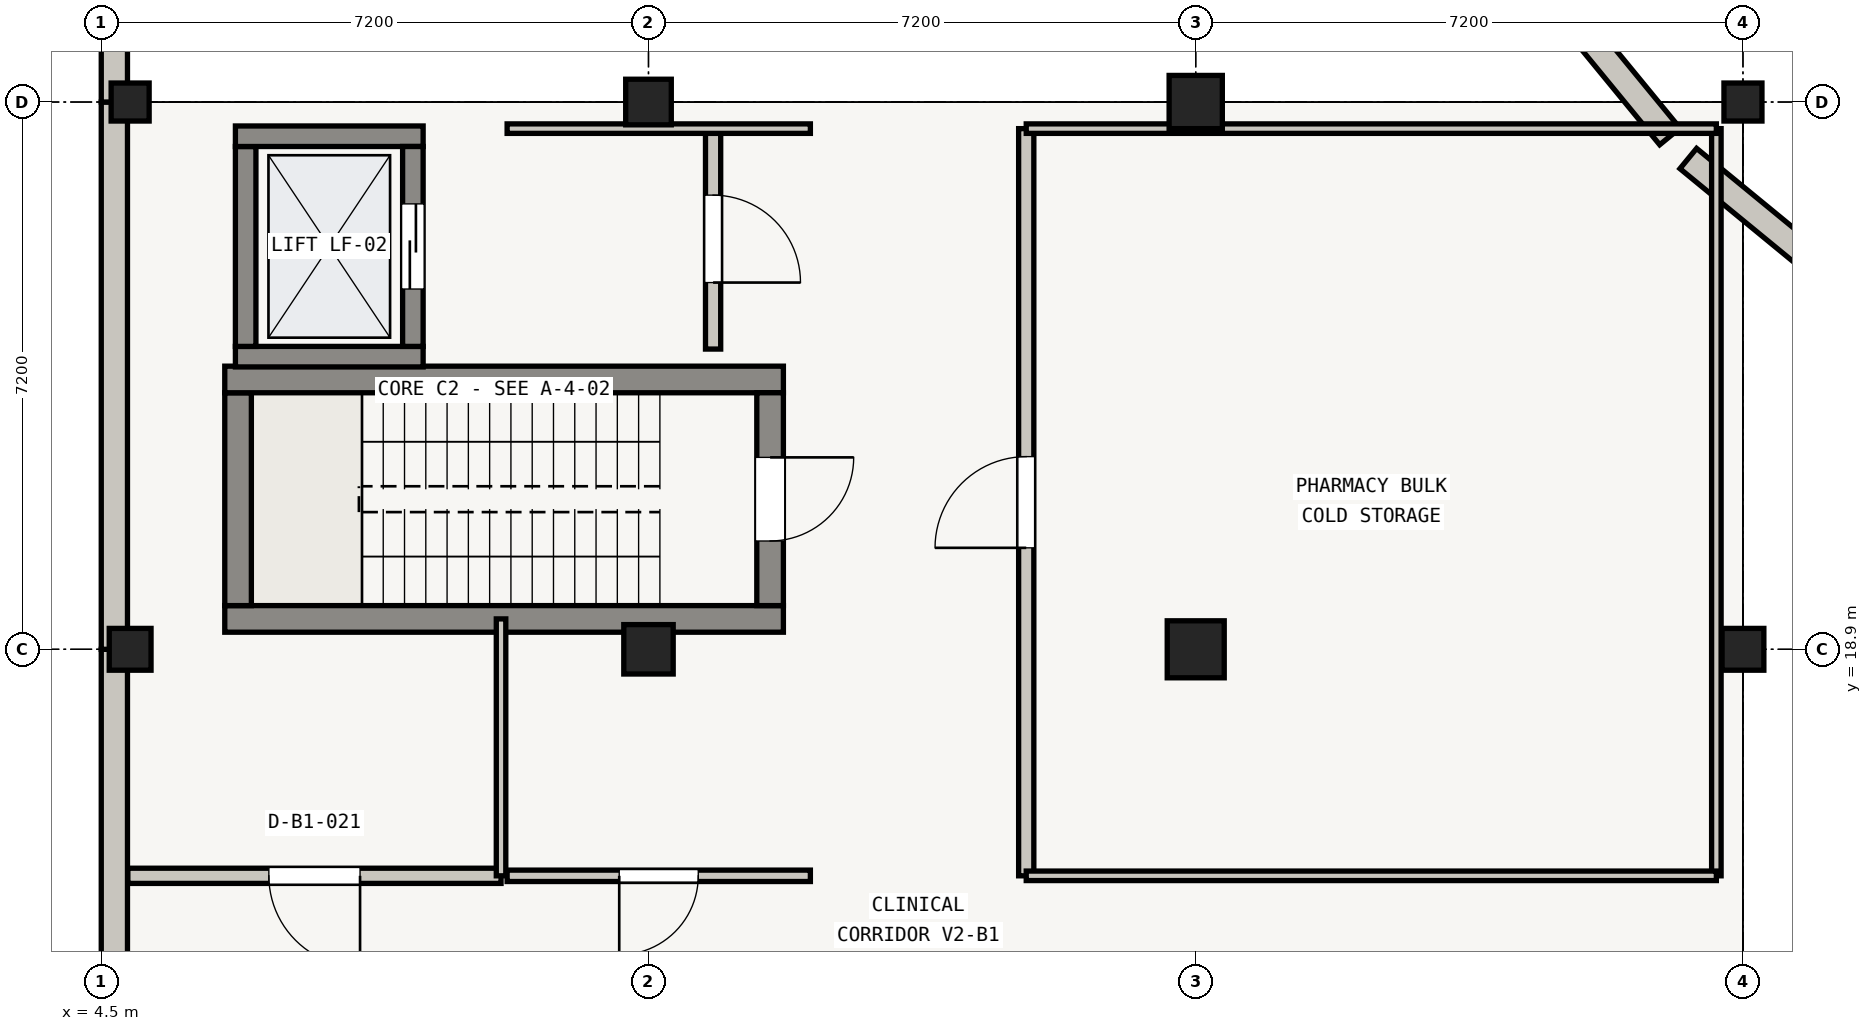
"""IFC4 building model, lengths in metres.
Left out: names, types, materials, properties, quantities, classifications, styles, units other than length and angle.
Written with IfcOpenShell. Run it as: python <this file> out.ifc"""

import sys

from ifc_helpers import new_model, si_unit, direction, frame, frame_2d, origin, origin_2d, place, context, subcontext, project, spatial, rectangle, extrude, element, fill, save


model = new_model("IFC4")
c1 = context("Model", 3, precision=1e-05, world=origin(), true_north=direction((0.0, 1.0)))
c2 = subcontext(c1, "Body", "Model", "MODEL_VIEW")
j1 = project(units=[si_unit("LENGTHUNIT", "METRE"), si_unit("PLANEANGLEUNIT", "RADIAN")], contexts=[c1])
p1 = place(None, origin())
s1 = spatial("IfcSite", under=j1, at=p1, CompositionType="ELEMENT")
p2 = place(p1, origin())
s2 = spatial("IfcBuilding", under=s1, at=p2, CompositionType="ELEMENT")
p3 = place(p2, frame((0.0, 0.0, -4.5)))
s3 = spatial("IfcBuildingStorey", under=s2, at=p3, CompositionType="ELEMENT", Elevation=-4.5)
p4 = place(p3, frame((4.88, 18.9, -0.42), z_axis=(0.0, 0.0, 1.0), x_axis=(1.0, 0.0, 0.0)))
e1 = element("IfcColumn", 1, at=p4, inside=s3, PredefinedType="COLUMN", context=c2, shape_type="SweptSolid", body=[
    extrude(rectangle(XDim=0.55, YDim=0.55, at=origin_2d()), origin(), (0.0, 0.0, 1.0), 4.64),
])
p5 = place(p3, frame((4.88, 26.1, -0.42), z_axis=(0.0, 0.0, 1.0), x_axis=(1.0, 0.0, 0.0)))
e2 = element("IfcColumn", 2, at=p5, inside=s3, PredefinedType="COLUMN", context=c2, shape_type="SweptSolid", body=[
    extrude(rectangle(XDim=0.5, YDim=0.5, at=origin_2d()), origin(), (0.0, 0.0, 1.0), 4.64),
])
p6 = place(p3, frame((11.7, 18.9, -0.42), z_axis=(0.0, 0.0, 1.0), x_axis=(1.0, 0.0, 0.0)))
e3 = element("IfcColumn", 3, at=p6, inside=s3, PredefinedType="COLUMN", context=c2, shape_type="SweptSolid", body=[
    extrude(rectangle(XDim=0.65, YDim=0.65, at=origin_2d()), origin(), (0.0, 0.0, 1.0), 4.64),
])
p7 = place(p3, frame((11.7, 26.1, -0.42), z_axis=(0.0, 0.0, 1.0), x_axis=(1.0, 0.0, 0.0)))
e4 = element("IfcColumn", 4, at=p7, inside=s3, PredefinedType="COLUMN", context=c2, shape_type="SweptSolid", body=[
    extrude(rectangle(XDim=0.6, YDim=0.6, at=origin_2d()), origin(), (0.0, 0.0, 1.0), 4.64),
])
p8 = place(p3, frame((18.9, 18.9, -0.42), z_axis=(0.0, 0.0, 1.0), x_axis=(1.0, 0.0, 0.0)))
e5 = element("IfcColumn", 5, at=p8, inside=s3, PredefinedType="COLUMN", context=c2, shape_type="SweptSolid", body=[
    extrude(rectangle(XDim=0.75, YDim=0.75, at=origin_2d()), origin(), (0.0, 0.0, 1.0), 4.64),
])
p9 = place(p3, frame((18.9, 26.1, -0.42), z_axis=(0.0, 0.0, 1.0), x_axis=(1.0, 0.0, 0.0)))
e6 = element("IfcColumn", 6, at=p9, inside=s3, PredefinedType="COLUMN", context=c2, shape_type="SweptSolid", body=[
    extrude(rectangle(XDim=0.7, YDim=0.7, at=origin_2d()), origin(), (0.0, 0.0, 1.0), 4.64),
])
p10 = place(p3, frame((26.1, 18.9, -0.42), z_axis=(0.0, 0.0, 1.0), x_axis=(1.0, 0.0, 0.0)))
e7 = element("IfcColumn", 7, at=p10, inside=s3, PredefinedType="COLUMN", context=c2, shape_type="SweptSolid", body=[
    extrude(rectangle(XDim=0.55, YDim=0.55, at=origin_2d()), origin(), (0.0, 0.0, 1.0), 4.64),
])
p11 = place(p3, frame((26.1, 26.1, -0.42), z_axis=(0.0, 0.0, 1.0), x_axis=(1.0, 0.0, 0.0)))
e8 = element("IfcColumn", 8, at=p11, inside=s3, PredefinedType="COLUMN", context=c2, shape_type="SweptSolid", body=[
    extrude(rectangle(XDim=0.5, YDim=0.5, at=origin_2d()), origin(), (0.0, 0.0, 1.0), 4.64),
])
p12 = place(p3, frame((22.777, 28.524, -0.42), z_axis=(0.0, 0.0, 1.0), x_axis=(0.634416148035, -0.772991688903, 0.0)))
e9 = element("IfcWall", 9, at=p12, inside=s3, PredefinedType="SOLIDWALL", context=c2, shape_type="SweptSolid", body=[
    extrude(rectangle(XDim=3.721, YDim=0.345, at=frame_2d((1.86, 0.0))), origin(), (0.0, 0.0, 1.0), 4.175),
])
p13 = place(p3, frame((25.381, 25.357, -0.42), z_axis=(0.0, 0.0, 1.0), x_axis=(0.773026739032, -0.634373439499, 0.0)))
e10 = element("IfcWall", 10, at=p13, inside=s3, PredefinedType="SOLIDWALL", context=c2, shape_type="SweptSolid", body=[
    extrude(rectangle(XDim=4.411, YDim=0.345, at=frame_2d((2.206, 0.0))), origin(), (0.0, 0.0, 1.0), 3.975),
])
p14 = place(p3, frame((4.673, 11.7, -0.42), z_axis=(0.0, 0.0, 1.0), x_axis=(0.0, 1.0, 0.0)))
e11 = element("IfcWall", 11, at=p14, inside=s3, PredefinedType="SOLIDWALL", context=c2, shape_type="SweptSolid", body=[
    extrude(rectangle(XDim=7.2, YDim=0.345, at=frame_2d((3.6, 0.0))), origin(), (0.0, 0.0, 1.0), 4.005),
])
p15 = place(p3, frame((4.673, 18.9, -0.42), z_axis=(0.0, 0.0, 1.0), x_axis=(0.0, 1.0, 0.0)))
e12 = element("IfcWall", 12, at=p15, inside=s3, PredefinedType="SOLIDWALL", context=c2, shape_type="SweptSolid", body=[
    extrude(rectangle(XDim=7.2, YDim=0.345, at=frame_2d((3.6, 0.0))), origin(), (0.0, 0.0, 1.0), 4.025),
])
p16 = place(p3, frame((4.673, 26.1, -0.42), z_axis=(0.0, 0.0, 1.0), x_axis=(0.0, 1.0, 0.0)))
e13 = element("IfcWall", 13, at=p16, inside=s3, PredefinedType="SOLIDWALL", context=c2, shape_type="SweptSolid", body=[
    extrude(rectangle(XDim=10.2, YDim=0.345, at=frame_2d((5.1, 0.0))), origin(), (0.0, 0.0, 1.0), 4.045),
])
p17 = place(p3, frame((13.475, 19.3, 0.0), z_axis=(0.0, 0.0, 1.0), x_axis=(-1.0, 0.0, 0.0)))
e14 = element("IfcWall", 14, at=p17, inside=s3, PredefinedType="SHEAR", context=c2, shape_type="SweptSolid", body=[
    extrude(rectangle(XDim=7.35, YDim=0.35, at=frame_2d((3.675, 0.0))), origin(), (0.0, 0.0, 1.0), 4.22),
])
p18 = place(p3, frame((6.3, 19.475, 0.0), z_axis=(0.0, 0.0, 1.0), x_axis=(0.0, 1.0, 0.0)))
e15 = element("IfcWall", 15, at=p18, inside=s3, PredefinedType="SHEAR", context=c2, shape_type="SweptSolid", body=[
    extrude(rectangle(XDim=2.8, YDim=0.35, at=frame_2d((1.4, 0.0))), origin(), (0.0, 0.0, 1.0), 4.22),
])
p19 = place(p3, frame((6.125, 22.45, 0.0), z_axis=(0.0, 0.0, 1.0), x_axis=(1.0, 0.0, 0.0)))
e16 = element("IfcWall", 16, at=p19, inside=s3, PredefinedType="SHEAR", context=c2, shape_type="SweptSolid", body=[
    extrude(rectangle(XDim=7.35, YDim=0.35, at=frame_2d((3.675, 0.0))), origin(), (0.0, 0.0, 1.0), 4.22),
])
p20 = place(p3, frame((13.3, 22.275, 0.0), z_axis=(0.0, 0.0, 1.0), x_axis=(0.0, -1.0, 0.0)))
e17 = element("IfcWall", 17, at=p20, inside=s3, PredefinedType="SHEAR", context=c2, shape_type="SweptSolid", body=[
    extrude(rectangle(XDim=2.8, YDim=0.35, at=frame_2d((1.4, 0.0))), origin(), (0.0, 0.0, 1.0), 4.22),
])
p21 = place(p20, frame((0.85, 0.0, 0.0)))
e18 = element("IfcOpeningElement", 18, at=p21, cuts=e17, PredefinedType="OPENING", context=c2, shape_type="SweptSolid", body=[
    extrude(rectangle(XDim=1.1, YDim=2.05, at=frame_2d((0.55, 1.025))), frame((0.0, 0.175, 0.0), z_axis=(0.0, -1.0, 0.0), x_axis=(1.0, 0.0, 0.0)), (0.0, 0.0, 1.0), 0.35),
])
p22 = place(p3, frame((8.735, 22.75, 0.0), z_axis=(0.0, 0.0, 1.0), x_axis=(-1.0, 0.0, 0.0)))
e19 = element("IfcWall", 19, at=p22, inside=s3, PredefinedType="SHEAR", context=c2, shape_type="SweptSolid", body=[
    extrude(rectangle(XDim=2.47, YDim=0.27, at=frame_2d((1.235, 0.0))), origin(), (0.0, 0.0, 1.0), 4.22),
])
p23 = place(p3, frame((6.4, 22.885, 0.0), z_axis=(0.0, 0.0, 1.0), x_axis=(0.0, 1.0, 0.0)))
e20 = element("IfcWall", 20, at=p23, inside=s3, PredefinedType="SHEAR", context=c2, shape_type="SweptSolid", body=[
    extrude(rectangle(XDim=2.63, YDim=0.27, at=frame_2d((1.315, 0.0))), origin(), (0.0, 0.0, 1.0), 4.22),
])
p24 = place(p3, frame((6.265, 25.65, 0.0), z_axis=(0.0, 0.0, 1.0), x_axis=(1.0, 0.0, 0.0)))
e21 = element("IfcWall", 21, at=p24, inside=s3, PredefinedType="SHEAR", context=c2, shape_type="SweptSolid", body=[
    extrude(rectangle(XDim=2.47, YDim=0.27, at=frame_2d((1.235, 0.0))), origin(), (0.0, 0.0, 1.0), 4.22),
])
p25 = place(p3, frame((8.6, 25.515, 0.0), z_axis=(0.0, 0.0, 1.0), x_axis=(0.0, -1.0, 0.0)))
e22 = element("IfcWall", 22, at=p25, inside=s3, PredefinedType="SHEAR", context=c2, shape_type="SweptSolid", body=[
    extrude(rectangle(XDim=2.63, YDim=0.27, at=frame_2d((1.315, 0.0))), origin(), (0.0, 0.0, 1.0), 4.22),
])
p26 = place(p25, frame((0.755, 0.0, 0.0)))
e23 = element("IfcOpeningElement", 23, at=p26, cuts=e22, PredefinedType="OPENING", context=c2, shape_type="SweptSolid", body=[
    extrude(rectangle(XDim=1.12, YDim=2.1, at=frame_2d((0.56, 1.05))), frame((0.0, 0.135, 0.0), z_axis=(0.0, -1.0, 0.0), x_axis=(1.0, 0.0, 0.0)), (0.0, 0.0, 1.0), 0.27),
])
p27 = place(p3, frame((12.55, 25.75, 0.0), z_axis=(0.0, 0.0, 1.0), x_axis=(0.0, -1.0, 0.0)))
e24 = element("IfcWall", 24, at=p27, inside=s3, PredefinedType="SOLIDWALL", context=c2, shape_type="SweptSolid", body=[
    extrude(rectangle(XDim=2.9, YDim=0.2, at=frame_2d((1.45, 0.0))), origin(), (0.0, 0.0, 1.0), 3.24),
])
p28 = place(p27, frame((0.875, 0.0, 0.0)))
e25 = element("IfcOpeningElement", 25, at=p28, cuts=e24, PredefinedType="OPENING", context=c2, shape_type="SweptSolid", body=[
    extrude(rectangle(XDim=1.15, YDim=2.05, at=frame_2d((0.575, 1.025))), frame((0.0, 0.1, 0.0), z_axis=(0.0, -1.0, 0.0), x_axis=(1.0, 0.0, 0.0)), (0.0, 0.0, 1.0), 0.2),
])
p29 = place(p3, frame((16.67, 15.92, 0.0), z_axis=(0.0, 0.0, 1.0), x_axis=(0.0, 1.0, 0.0)))
e26 = element("IfcWall", 26, at=p29, inside=s3, PredefinedType="SOLIDWALL", context=c2, shape_type="SweptSolid", body=[
    extrude(rectangle(XDim=9.83, YDim=0.2, at=frame_2d((4.915, 0.0))), origin(), (0.0, 0.0, 1.0), 3.24),
])
p30 = place(p29, frame((4.315, 0.0, 0.0)))
e27 = element("IfcOpeningElement", 27, at=p30, cuts=e26, PredefinedType="OPENING", context=c2, shape_type="SweptSolid", body=[
    extrude(rectangle(XDim=1.2, YDim=2.05, at=frame_2d((0.6, 1.025))), frame((0.0, 0.1, 0.0), z_axis=(0.0, -1.0, 0.0), x_axis=(1.0, 0.0, 0.0)), (0.0, 0.0, 1.0), 0.2),
])
p31 = place(p3, frame((25.75, 25.75, 0.0), z_axis=(0.0, 0.0, 1.0), x_axis=(0.0, -1.0, 0.0)))
e28 = element("IfcWall", 28, at=p31, inside=s3, PredefinedType="PARTITIONING", context=c2, shape_type="SweptSolid", body=[
    extrude(rectangle(XDim=9.83, YDim=0.125, at=frame_2d((4.915, 0.0))), origin(), (0.0, 0.0, 1.0), 3.24),
])
for number, where, z_axis, x_axis in (
    (29, (25.75, 15.92, 0.0), (0.0, 0.0, 1.0), (-1.0, 0.0, 0.0)),
    (30, (16.67, 25.75, 0.0), (0.0, 0.0, 1.0), (1.0, 0.0, 0.0)),
):
    element("IfcWall", number, at=place(p3, frame(where, z_axis=z_axis, x_axis=x_axis)), inside=s3, PredefinedType="PARTITIONING", context=c2, shape_type="SweptSolid", body=[
        extrude(rectangle(XDim=9.08, YDim=0.125, at=frame_2d((4.54, 0.0))), origin(), (0.0, 0.0, 1.0), 3.24),
    ])
p32 = place(p3, frame((9.76, 15.92, 0.0), z_axis=(0.0, 0.0, 1.0), x_axis=(-1.0, 0.0, 0.0)))
e31 = element("IfcWall", 31, at=p32, inside=s3, PredefinedType="SOLIDWALL", context=c2, shape_type="SweptSolid", body=[
    extrude(rectangle(XDim=4.91, YDim=0.2, at=frame_2d((2.455, 0.0))), origin(), (0.0, 0.0, 1.0), 3.24),
])
p33 = place(p32, frame((1.855, 0.0, 0.0)))
e32 = element("IfcOpeningElement", 32, at=p33, cuts=e31, PredefinedType="OPENING", context=c2, shape_type="SweptSolid", body=[
    extrude(rectangle(XDim=1.2, YDim=2.05, at=frame_2d((0.6, 1.025))), frame((0.0, 0.1, 0.0), z_axis=(0.0, -1.0, 0.0), x_axis=(1.0, 0.0, 0.0)), (0.0, 0.0, 1.0), 0.2),
])
p34 = place(p3, frame((9.76, 19.3, 0.0), z_axis=(0.0, 0.0, 1.0), x_axis=(0.0, -1.0, 0.0)))
e33 = element("IfcWall", 33, at=p34, inside=s3, PredefinedType="PARTITIONING", context=c2, shape_type="SweptSolid", body=[
    extrude(rectangle(XDim=3.38, YDim=0.125, at=frame_2d((1.69, 0.0))), origin(), (0.0, 0.0, 1.0), 3.24),
])
p35 = place(p3, frame((13.83, 15.92, 0.0), z_axis=(0.0, 0.0, 1.0), x_axis=(-1.0, 0.0, 0.0)))
e34 = element("IfcWall", 34, at=p35, inside=s3, PredefinedType="PARTITIONING", context=c2, shape_type="SweptSolid", body=[
    extrude(rectangle(XDim=3.99, YDim=0.15, at=frame_2d((1.995, 0.0))), origin(), (0.0, 0.0, 1.0), 3.24),
])
p36 = place(p35, frame((1.475, 0.0, 0.0)))
e35 = element("IfcOpeningElement", 35, at=p36, cuts=e34, PredefinedType="OPENING", context=c2, shape_type="SweptSolid", body=[
    extrude(rectangle(XDim=1.04, YDim=2.05, at=frame_2d((0.52, 1.025))), frame((0.0, 0.075, 0.0), z_axis=(0.0, -1.0, 0.0), x_axis=(1.0, 0.0, 0.0)), (0.0, 0.0, 1.0), 0.15),
])
p37 = place(p3, frame((9.84, 25.75, 0.0), z_axis=(0.0, 0.0, 1.0), x_axis=(1.0, 0.0, 0.0)))
e36 = element("IfcWall", 36, at=p37, inside=s3, PredefinedType="PARTITIONING", context=c2, shape_type="SweptSolid", body=[
    extrude(rectangle(XDim=3.99, YDim=0.125, at=frame_2d((1.995, 0.0))), origin(), (0.0, 0.0, 1.0), 3.24),
])
p38 = place(p21, origin())
e37 = element("IfcDoor", 37, at=p38, inside=s3, OperationType="SINGLE_SWING_LEFT", PredefinedType="DOOR", context=c2, shape_type="SweptSolid", body=[
    extrude(rectangle(XDim=1.1, YDim=2.05, at=frame_2d((0.55, 1.025))), frame((0.0, 0.025, 0.0), z_axis=(0.0, -1.0, 0.0), x_axis=(1.0, 0.0, 0.0)), (0.0, 0.0, 1.0), 0.05),
])
fill(e18, e37)
p39 = place(p26, origin())
e38 = element("IfcDoor", 38, at=p39, inside=s3, OperationType="DOUBLE_DOOR_SLIDING", PredefinedType="DOOR", context=c2, shape_type="SweptSolid", body=[
    extrude(rectangle(XDim=1.12, YDim=2.1, at=frame_2d((0.56, 1.05))), frame((0.0, 0.025, 0.0), z_axis=(0.0, -1.0, 0.0), x_axis=(1.0, 0.0, 0.0)), (0.0, 0.0, 1.0), 0.05),
])
fill(e23, e38)
p40 = place(p28, origin())
e39 = element("IfcDoor", 39, at=p40, inside=s3, OperationType="SINGLE_SWING_RIGHT", PredefinedType="DOOR", context=c2, shape_type="SweptSolid", body=[
    extrude(rectangle(XDim=1.15, YDim=2.05, at=frame_2d((0.575, 1.025))), frame((0.0, 0.025, 0.0), z_axis=(0.0, -1.0, 0.0), x_axis=(1.0, 0.0, 0.0)), (0.0, 0.0, 1.0), 0.05),
])
fill(e25, e39)
p41 = place(p30, origin())
e40 = element("IfcDoor", 40, at=p41, inside=s3, OperationType="SINGLE_SWING_LEFT", PredefinedType="DOOR", context=c2, shape_type="SweptSolid", body=[
    extrude(rectangle(XDim=1.2, YDim=2.05, at=frame_2d((0.6, 1.025))), frame((0.0, 0.025, 0.0), z_axis=(0.0, -1.0, 0.0), x_axis=(1.0, 0.0, 0.0)), (0.0, 0.0, 1.0), 0.05),
])
fill(e27, e40)
p42 = place(p33, origin())
e41 = element("IfcDoor", 41, at=p42, inside=s3, OperationType="SINGLE_SWING_LEFT", PredefinedType="DOOR", context=c2, shape_type="SweptSolid", body=[
    extrude(rectangle(XDim=1.2, YDim=2.05, at=frame_2d((0.6, 1.025))), frame((0.0, 0.025, 0.0), z_axis=(0.0, -1.0, 0.0), x_axis=(1.0, 0.0, 0.0)), (0.0, 0.0, 1.0), 0.05),
])
fill(e32, e41)
p43 = place(p36, origin())
e42 = element("IfcDoor", 42, at=p43, inside=s3, OperationType="SINGLE_SWING_RIGHT", PredefinedType="DOOR", context=c2, shape_type="SweptSolid", body=[
    extrude(rectangle(XDim=1.04, YDim=2.05, at=frame_2d((0.52, 1.025))), frame((0.0, 0.025, 0.0), z_axis=(0.0, -1.0, 0.0), x_axis=(1.0, 0.0, 0.0)), (0.0, 0.0, 1.0), 0.05),
])
fill(e35, e42)
save(model, sys.argv[1])
